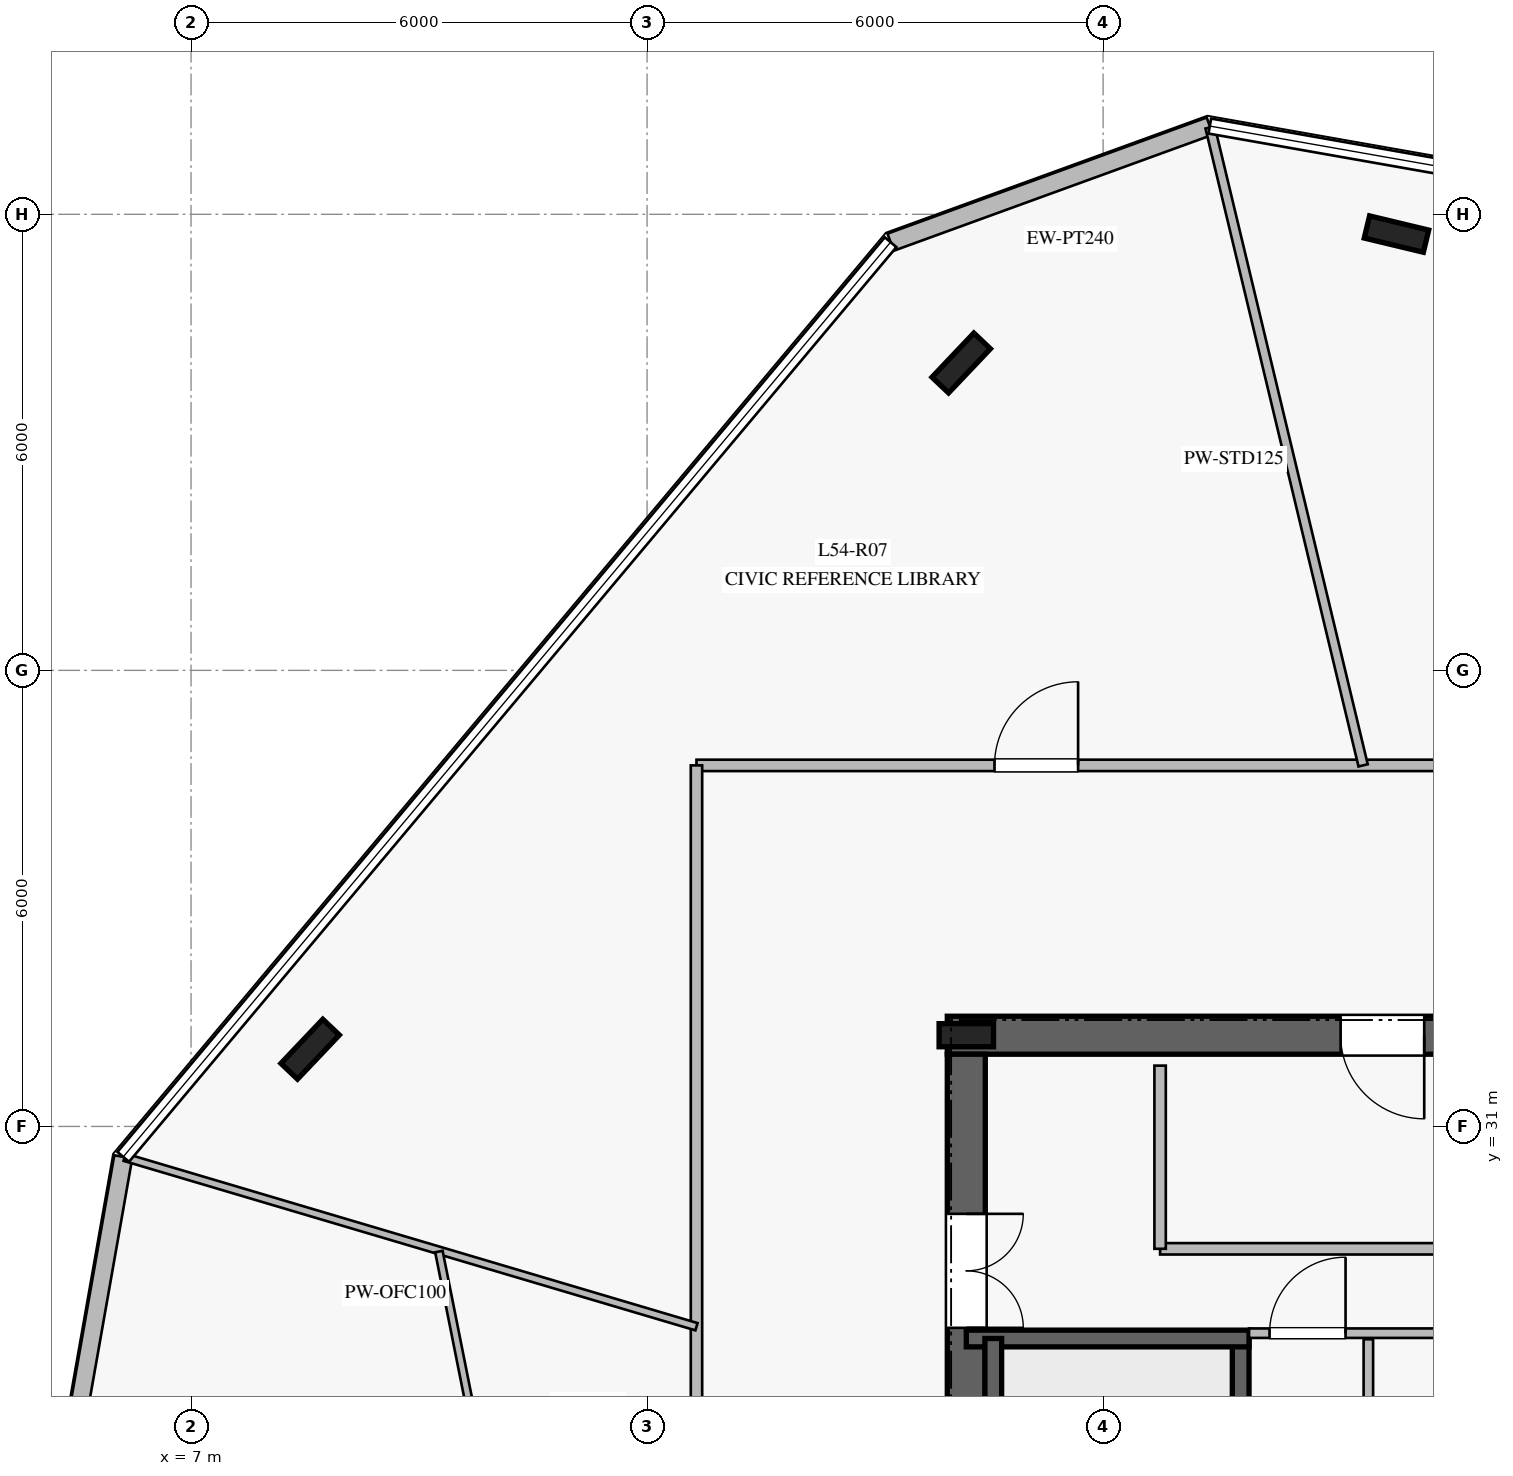
"""IFC4 building model, lengths in metres.
Left out: names, types, materials, properties, quantities, classifications, styles, units other than length and angle.
Written with IfcOpenShell. Run it as: python <this file> out.ifc"""

import sys

from ifc_helpers import new_model, si_unit, direction, frame, frame_2d, origin, origin_2d, place, context, subcontext, project, spatial, rectangle, i_section, extrude, element, fill, save


model = new_model("IFC4")
c1 = context("Model", 3, precision=1e-05, world=origin(), true_north=direction((0.0, 1.0)))
c2 = subcontext(c1, "Body", "Model", "MODEL_VIEW")
j1 = project(units=[si_unit("LENGTHUNIT", "METRE"), si_unit("PLANEANGLEUNIT", "RADIAN")], contexts=[c1])
p1 = place(None, origin())
s1 = spatial("IfcSite", under=j1, at=p1, CompositionType="ELEMENT")
p2 = place(p1, origin())
s2 = spatial("IfcBuilding", under=s1, at=p2, CompositionType="ELEMENT")
p3 = place(p2, frame((0.0, 0.0, 224.8)))
s3 = spatial("IfcBuildingStorey", under=s2, at=p3, CompositionType="ELEMENT", Elevation=224.8)
p4 = place(p3, frame((33.05, 32.2, 0.0), z_axis=(0.0, 0.0, 1.0), x_axis=(-1.0, 0.0, 0.0)))
e1 = element("IfcWall", 1, at=p4, inside=s3, PredefinedType="SHEAR", context=c2, shape_type="SweptSolid", body=[
    extrude(rectangle(XDim=16.1, YDim=0.5, at=frame_2d((8.05, 0.0))), origin(), (0.0, 0.0, 1.0), 3.78),
])
p5 = place(p4, frame((5.0, 0.0, 0.0)))
e2 = element("IfcOpeningElement", 2, at=p5, cuts=e1, PredefinedType="OPENING", context=c2, shape_type="SweptSolid", body=[
    extrude(rectangle(XDim=1.2, YDim=2.25, at=frame_2d((0.6, 1.125))), frame((0.0, 0.26, 0.0), z_axis=(0.0, -1.0, 0.0), x_axis=(1.0, 0.0, 0.0)), (0.0, 0.0, 1.0), 0.52),
])
p6 = place(p4, frame((9.825, 0.0, 0.0)))
e3 = element("IfcOpeningElement", 3, at=p6, cuts=e1, PredefinedType="OPENING", context=c2, shape_type="SweptSolid", body=[
    extrude(rectangle(XDim=1.1, YDim=2.2, at=frame_2d((0.55, 1.1))), frame((0.0, 0.26, 0.0), z_axis=(0.0, -1.0, 0.0), x_axis=(1.0, 0.0, 0.0)), (0.0, 0.0, 1.0), 0.52),
])
p7 = place(p3, frame((17.2, 31.95, 0.0), z_axis=(0.0, 0.0, 1.0), x_axis=(0.0, -1.0, 0.0)))
e4 = element("IfcWall", 4, at=p7, inside=s3, PredefinedType="SHEAR", context=c2, shape_type="SweptSolid", body=[
    extrude(rectangle(XDim=13.9, YDim=0.5, at=frame_2d((6.95, 0.0))), origin(), (0.0, 0.0, 1.0), 3.78),
])
p8 = place(p7, frame((2.1, 0.0, 0.0)))
e5 = element("IfcOpeningElement", 5, at=p8, cuts=e4, PredefinedType="OPENING", context=c2, shape_type="SweptSolid", body=[
    extrude(rectangle(XDim=1.5, YDim=2.2, at=frame_2d((0.75, 1.1))), frame((0.0, 0.26, 0.0), z_axis=(0.0, -1.0, 0.0), x_axis=(1.0, 0.0, 0.0)), (0.0, 0.0, 1.0), 0.52),
])
p9 = place(p3, frame((17.2, 32.2, 0.0), z_axis=(0.0, 0.0, 1.0), x_axis=(1.0, 0.0, 0.0)))
e6 = element("IfcColumn", 6, at=p9, inside=s3, PredefinedType="COLUMN", context=c2, shape_type="SweptSolid", body=[
    extrude(i_section(OverallWidth=0.304, OverallDepth=0.716, WebThickness=0.021, FlangeThickness=0.04, at=origin_2d()), origin(), (0.0, 0.0, 1.0), 4.0),
])
p10 = place(p3, frame((20.81, 20.99, 0.0), z_axis=(0.0, 0.0, 1.0), x_axis=(0.0, 1.0, 0.0)))
e7 = element("IfcWall", 7, at=p10, inside=s3, PredefinedType="SOLIDWALL", context=c2, shape_type="SweptSolid", body=[
    extrude(rectangle(XDim=7.22, YDim=0.22, at=frame_2d((3.61, 0.0))), origin(), (0.0, 0.0, 1.0), 3.78),
])
p11 = place(p10, frame((0.18, 0.0, 0.0)))
e8 = element("IfcOpeningElement", 8, at=p11, cuts=e7, PredefinedType="OPENING", context=c2, shape_type="SweptSolid", body=[
    extrude(rectangle(XDim=1.15, YDim=2.2, at=frame_2d((0.575, 1.1))), frame((0.0, 0.12, 0.0), z_axis=(0.0, -1.0, 0.0), x_axis=(1.0, 0.0, 0.0)), (0.0, 0.0, 1.0), 0.24),
])
p12 = place(p3, frame((17.2, 28.21, 0.0), z_axis=(0.0, 0.0, 1.0), x_axis=(1.0, 0.0, 0.0)))
e9 = element("IfcWall", 9, at=p12, inside=s3, PredefinedType="SOLIDWALL", context=c2, shape_type="SweptSolid", body=[
    extrude(rectangle(XDim=3.72, YDim=0.22, at=frame_2d((1.86, 0.0))), origin(), (0.0, 0.0, 1.0), 3.78),
])
p13 = place(p3, frame((17.555, 28.21, 0.0), z_axis=(0.0, 0.0, 1.0), x_axis=(0.0, -1.0, 0.0)))
e10 = element("IfcWall", 10, at=p13, inside=s3, PredefinedType="SOLIDWALL", context=c2, shape_type="SweptSolid", body=[
    extrude(rectangle(XDim=7.22, YDim=0.22, at=frame_2d((3.61, 0.0))), origin(), (0.0, 0.0, 1.0), 3.78),
])
for number, where, z_axis, x_axis in (
    (11, (22.86, 42.74, 0.0), (0.0, 0.0, 1.0), (-0.972, 0.233, 0.0)),
    (12, (17.133, 41.044, 0.0), (0.0, 0.0, 1.0), (0.688, 0.725, 0.0)),
    (13, (8.567, 32.016, 0.0), (0.0, 0.0, 1.0), (0.688, 0.725, 0.0)),
):
    element("IfcColumn", number, at=place(p3, frame(where, z_axis=z_axis, x_axis=x_axis)), inside=s3, PredefinedType="COLUMN", context=c2, shape_type="SweptSolid", body=[
        extrude(i_section(OverallWidth=0.3, OverallDepth=0.8, WebThickness=0.018, FlangeThickness=0.033, at=origin_2d()), origin(), (0.0, 0.0, 1.0), 4.0),
    ])
p14 = place(p3, frame((20.404, 44.161, 0.0), z_axis=(0.0, 0.0, 1.0), x_axis=(-0.939751947736, -0.341857099862, 0.0)))
e14 = element("IfcWall", 14, at=p14, inside=s3, PredefinedType="STANDARD", context=c2, shape_type="SweptSolid", body=[
    extrude(rectangle(XDim=4.469, YDim=0.24, at=frame_2d((2.235, 0.0))), origin(), (0.0, 0.0, 1.0), 3.78),
])
p15 = place(p3, frame((6.108, 30.6, 0.0), z_axis=(0.0, 0.0, 1.0), x_axis=(-0.173613925281, -0.984813792018, 0.0)))
e15 = element("IfcWall", 15, at=p15, inside=s3, PredefinedType="STANDARD", context=c2, shape_type="SweptSolid", body=[
    extrude(rectangle(XDim=4.469, YDim=0.24, at=frame_2d((2.234, 0.0))), origin(), (0.0, 0.0, 1.0), 3.78),
])
p16 = place(p3, frame((20.92, 28.28, 0.0), z_axis=(0.0, 0.0, 1.0), x_axis=(1.0, 0.0, 0.0)))
e16 = element("IfcWall", 16, at=p16, inside=s3, PredefinedType="PARTITIONING", context=c2, shape_type="SweptSolid", body=[
    extrude(rectangle(XDim=3.405, YDim=0.125, at=frame_2d((1.703, 0.0))), origin(), (0.0, 0.0, 1.0), 3.78),
])
p17 = place(p16, frame((0.27, 0.0, 0.0)))
e17 = element("IfcOpeningElement", 17, at=p17, cuts=e16, PredefinedType="OPENING", context=c2, shape_type="SweptSolid", body=[
    extrude(rectangle(XDim=1.0, YDim=2.15, at=frame_2d((0.5, 1.075))), frame((0.0, 0.073, 0.0), z_axis=(0.0, -1.0, 0.0), x_axis=(1.0, 0.0, 0.0)), (0.0, 0.0, 1.0), 0.145),
])
p18 = place(p3, frame((22.49, 24.97, 0.0), z_axis=(0.0, 0.0, 1.0), x_axis=(0.0, 1.0, 0.0)))
e18 = element("IfcWall", 18, at=p18, inside=s3, PredefinedType="PARTITIONING", context=c2, shape_type="SweptSolid", body=[
    extrude(rectangle(XDim=3.23, YDim=0.125, at=frame_2d((1.615, 0.0))), origin(), (0.0, 0.0, 1.0), 3.78),
])
p19 = place(p3, frame((19.75, 29.39, 0.0), z_axis=(0.0, 0.0, 1.0), x_axis=(1.0, 0.0, 0.0)))
e19 = element("IfcWall", 19, at=p19, inside=s3, PredefinedType="PARTITIONING", context=c2, shape_type="SweptSolid", body=[
    extrude(rectangle(XDim=5.9, YDim=0.15, at=frame_2d((2.95, 0.0))), origin(), (0.0, 0.0, 1.0), 3.78),
])
p20 = place(p3, frame((19.75, 29.39, 0.0), z_axis=(0.0, 0.0, 1.0), x_axis=(0.0, 1.0, 0.0)))
e20 = element("IfcWall", 20, at=p20, inside=s3, PredefinedType="PARTITIONING", context=c2, shape_type="SweptSolid", body=[
    extrude(rectangle(XDim=2.41, YDim=0.15, at=frame_2d((1.205, 0.0))), origin(), (0.0, 0.0, 1.0), 3.78),
])
p21 = place(p3, frame((13.65, 35.75, 0.0), z_axis=(0.0, 0.0, 1.0), x_axis=(1.0, 0.0, 0.0)))
e21 = element("IfcWall", 21, at=p21, inside=s3, PredefinedType="PARTITIONING", context=c2, shape_type="SweptSolid", body=[
    extrude(rectangle(XDim=22.7, YDim=0.15, at=frame_2d((11.35, 0.0))), origin(), (0.0, 0.0, 1.0), 3.05),
])
p22 = place(p21, frame((14.995, 0.0, 0.0)))
e22 = element("IfcOpeningElement", 22, at=p22, cuts=e21, PredefinedType="OPENING", context=c2, shape_type="SweptSolid", body=[
    extrude(rectangle(XDim=1.1, YDim=2.2, at=frame_2d((0.55, 1.1))), frame((0.0, 0.085, 0.0), z_axis=(0.0, -1.0, 0.0), x_axis=(1.0, 0.0, 0.0)), (0.0, 0.0, 1.0), 0.17),
])
p23 = place(p21, frame((3.921, 0.0, 0.0)))
e23 = element("IfcOpeningElement", 23, at=p23, cuts=e21, PredefinedType="OPENING", context=c2, shape_type="SweptSolid", body=[
    extrude(rectangle(XDim=1.1, YDim=2.2, at=frame_2d((0.55, 1.1))), frame((0.0, 0.085, 0.0), z_axis=(0.0, -1.0, 0.0), x_axis=(1.0, 0.0, 0.0)), (0.0, 0.0, 1.0), 0.17),
])
p24 = place(p3, frame((13.65, 14.25, 0.0), z_axis=(0.0, 0.0, 1.0), x_axis=(0.0, 1.0, 0.0)))
e24 = element("IfcWall", 24, at=p24, inside=s3, PredefinedType="PARTITIONING", context=c2, shape_type="SweptSolid", body=[
    extrude(rectangle(XDim=21.5, YDim=0.15, at=frame_2d((10.75, 0.0))), origin(), (0.0, 0.0, 1.0), 3.28),
])
p25 = place(p24, frame((8.285, 0.0, 0.0)))
e25 = element("IfcOpeningElement", 25, at=p25, cuts=e24, PredefinedType="OPENING", context=c2, shape_type="SweptSolid", body=[
    extrude(rectangle(XDim=1.1, YDim=2.2, at=frame_2d((0.55, 1.1))), frame((0.0, 0.085, 0.0), z_axis=(0.0, -1.0, 0.0), x_axis=(1.0, 0.0, 0.0)), (0.0, 0.0, 1.0), 0.17),
])
p26 = place(p3, frame((22.421, 35.75, 0.0), z_axis=(0.0, 0.0, 1.0), x_axis=(-0.233219964305, 0.972424006414, 0.0)))
e26 = element("IfcWall", 26, at=p26, inside=s3, PredefinedType="PARTITIONING", context=c2, shape_type="SweptSolid", body=[
    extrude(rectangle(XDim=8.631, YDim=0.125, at=frame_2d((4.315, 0.0))), origin(), (0.0, 0.0, 1.0), 3.05),
])
p27 = place(p3, frame((13.65, 28.365, 0.0), z_axis=(0.0, 0.0, 1.0), x_axis=(-0.958774884237, 0.284166714018, 0.0)))
e27 = element("IfcWall", 27, at=p27, inside=s3, PredefinedType="MOVABLE", context=c2, shape_type="SweptSolid", body=[
    extrude(rectangle(XDim=7.847, YDim=0.1, at=frame_2d((3.924, 0.0))), origin(), (0.0, 0.0, 1.0), 3.18),
])
p28 = place(p3, frame((10.261, 29.354, 0.0), z_axis=(0.0, 0.0, 1.0), x_axis=(0.195937462268, -0.980616393336, 0.0)))
e28 = element("IfcWall", 28, at=p28, inside=s3, PredefinedType="MOVABLE", context=c2, shape_type="SweptSolid", body=[
    extrude(rectangle(XDim=12.351, YDim=0.1, at=frame_2d((6.175, 0.0))), origin(), (0.0, 0.0, 1.0), 3.28),
])
p29 = place(p28, frame((5.675, 0.0, 0.0)))
e29 = element("IfcOpeningElement", 29, at=p29, cuts=e28, PredefinedType="OPENING", context=c2, shape_type="SweptSolid", body=[
    extrude(rectangle(XDim=1.0, YDim=2.15, at=frame_2d((0.5, 1.075))), frame((0.0, 0.06, 0.0), z_axis=(0.0, -1.0, 0.0), x_axis=(1.0, 0.0, 0.0)), (0.0, 0.0, 1.0), 0.12),
])
p30 = place(p8, origin())
e30 = element("IfcDoor", 30, at=p30, inside=s3, OperationType="DOUBLE_DOOR_SINGLE_SWING", PredefinedType="DOOR", context=c2, shape_type="SweptSolid", body=[
    extrude(rectangle(XDim=1.5, YDim=2.2, at=frame_2d((0.75, 1.1))), frame((0.0, 0.025, 0.0), z_axis=(0.0, -1.0, 0.0), x_axis=(1.0, 0.0, 0.0)), (0.0, 0.0, 1.0), 0.05),
])
fill(e5, e30)
p31 = place(p17, origin())
e31 = element("IfcDoor", 31, at=p31, inside=s3, OperationType="SINGLE_SWING_RIGHT", PredefinedType="DOOR", context=c2, shape_type="SweptSolid", body=[
    extrude(rectangle(XDim=1.0, YDim=2.15, at=frame_2d((0.5, 1.075))), frame((0.0, 0.025, 0.0), z_axis=(0.0, -1.0, 0.0), x_axis=(1.0, 0.0, 0.0)), (0.0, 0.0, 1.0), 0.05),
])
fill(e17, e31)
p32 = place(p6, origin())
e32 = element("IfcDoor", 32, at=p32, inside=s3, OperationType="SINGLE_SWING_LEFT", PredefinedType="DOOR", context=c2, shape_type="SweptSolid", body=[
    extrude(rectangle(XDim=1.1, YDim=2.2, at=frame_2d((0.55, 1.1))), frame((0.0, 0.025, 0.0), z_axis=(0.0, -1.0, 0.0), x_axis=(1.0, 0.0, 0.0)), (0.0, 0.0, 1.0), 0.05),
])
fill(e3, e32)
p33 = place(p23, origin())
e33 = element("IfcDoor", 33, at=p33, inside=s3, OperationType="SINGLE_SWING_RIGHT", PredefinedType="DOOR", context=c2, shape_type="SweptSolid", body=[
    extrude(rectangle(XDim=1.1, YDim=2.2, at=frame_2d((0.55, 1.1))), frame((0.0, 0.025, 0.0), z_axis=(0.0, -1.0, 0.0), x_axis=(1.0, 0.0, 0.0)), (0.0, 0.0, 1.0), 0.05),
])
fill(e23, e33)
save(model, sys.argv[1])
